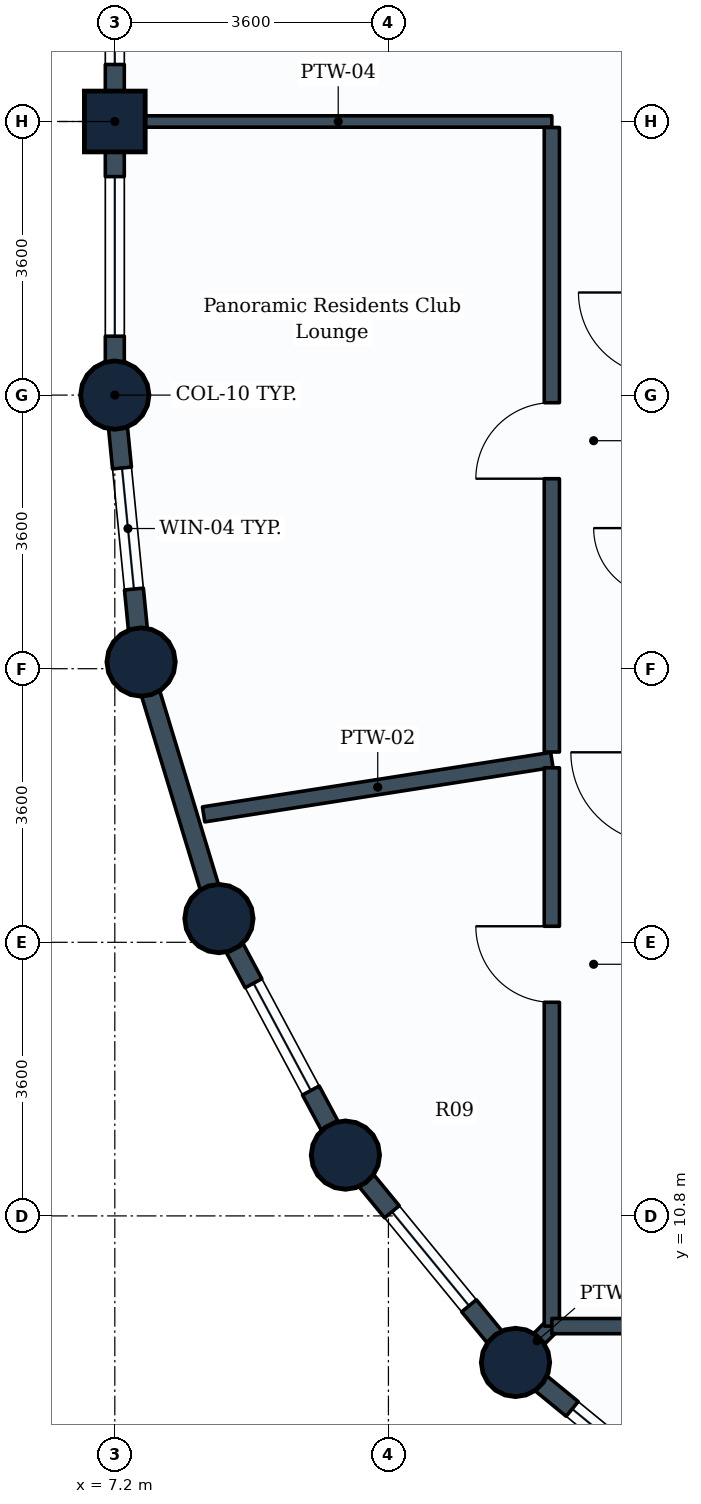
"""IFC4 building model, lengths in metres.
Left out: names, types, materials, properties, quantities, classifications, styles, units other than length and angle.
Written with IfcOpenShell. Run it as: python <this file> out.ifc"""

import sys

from ifc_helpers import new_model, si_unit, direction, frame, frame_2d, origin, origin_2d, place, context, subcontext, project, spatial, rectangle, circle, extrude, element, fill, save


model = new_model("IFC4")
c1 = context("Model", 3, precision=1e-05, world=origin(), true_north=direction((0.0, 1.0)))
c2 = subcontext(c1, "Body", "Model", "MODEL_VIEW")
j1 = project(units=[si_unit("LENGTHUNIT", "METRE"), si_unit("PLANEANGLEUNIT", "RADIAN")], contexts=[c1])
p1 = place(None, origin())
s1 = spatial("IfcSite", under=j1, at=p1, CompositionType="ELEMENT")
p2 = place(p1, origin())
s2 = spatial("IfcBuilding", under=s1, at=p2, CompositionType="ELEMENT")
p3 = place(p2, frame((0.0, 0.0, 231.8)))
s3 = spatial("IfcBuildingStorey", under=s2, at=p3, CompositionType="ELEMENT", Elevation=231.8)
p4 = place(p3, frame((7.2, 21.6, 0.0), z_axis=(0.0, 0.0, 1.0), x_axis=(1.0, 0.0, 0.0)))
e1 = element("IfcColumn", 1, at=p4, inside=s3, PredefinedType="COLUMN", context=c2, shape_type="SweptSolid", body=[
    extrude(circle(Radius=0.45, at=origin_2d()), origin(), (0.0, 0.0, 1.0), 3.6),
])
p5 = place(p3, frame((7.2, 25.2, 0.0), z_axis=(0.0, 0.0, 1.0), x_axis=(0.0, 1.0, 0.0)))
e2 = element("IfcColumn", 2, at=p5, inside=s3, PredefinedType="COLUMN", context=c2, shape_type="SweptSolid", body=[
    extrude(rectangle(XDim=0.8, YDim=0.8, at=origin_2d()), origin(), (0.0, 0.0, 1.0), 3.6),
])
for number, where, z_axis, x_axis in (
    (3, (7.546, 18.088, 0.0), (0.0, 0.0, 1.0), (1.0, 0.0, 0.0)),
    (4, (8.57, 14.712, 0.0), (0.0, 0.0, 1.0), (1.0, 0.0, 0.0)),
    (5, (10.234, 11.6, 0.0), (0.0, 0.0, 1.0), (1.0, 0.0, 0.0)),
    (6, (12.472, 8.872, 0.0), (0.0, 0.0, 1.0), (1.0, 0.0, 0.0)),
):
    element("IfcColumn", number, at=place(p3, frame(where, z_axis=z_axis, x_axis=x_axis)), inside=s3, PredefinedType="COLUMN", context=c2, shape_type="SweptSolid", body=[
        extrude(circle(Radius=0.45, at=origin_2d()), origin(), (0.0, 0.0, 1.0), 3.6),
    ])
p6 = place(p3, frame((7.2, 25.2, 0.0), z_axis=(0.0, 0.0, 1.0), x_axis=(0.0, 1.0, 0.0)))
e7 = element("IfcWall", 7, at=p6, inside=s3, PredefinedType="STANDARD", context=c2, shape_type="SweptSolid", body=[
    extrude(rectangle(XDim=3.6, YDim=0.25, at=frame_2d((1.8, 0.0))), origin(), (0.0, 0.0, 1.0), 2.83),
])
p7 = place(p6, frame((0.75, 0.0, 0.85)))
e8 = element("IfcOpeningElement", 8, at=p7, cuts=e7, PredefinedType="OPENING", context=c2, shape_type="SweptSolid", body=[
    extrude(rectangle(XDim=2.1, YDim=1.35, at=frame_2d((1.05, 0.675))), frame((0.0, 0.135, 0.0), z_axis=(0.0, -1.0, 0.0), x_axis=(1.0, 0.0, 0.0)), (0.0, 0.0, 1.0), 0.27),
])
p8 = place(p3, frame((7.2, 21.6, 0.0), z_axis=(0.0, 0.0, 1.0), x_axis=(0.0, 1.0, 0.0)))
e9 = element("IfcWall", 9, at=p8, inside=s3, PredefinedType="STANDARD", context=c2, shape_type="SweptSolid", body=[
    extrude(rectangle(XDim=3.6, YDim=0.25, at=frame_2d((1.8, 0.0))), origin(), (0.0, 0.0, 1.0), 2.83),
])
p9 = place(p8, frame((0.775, 0.0, 0.85)))
e10 = element("IfcOpeningElement", 10, at=p9, cuts=e9, PredefinedType="OPENING", context=c2, shape_type="SweptSolid", body=[
    extrude(rectangle(XDim=2.1, YDim=1.35, at=frame_2d((1.05, 0.675))), frame((0.0, 0.135, 0.0), z_axis=(0.0, -1.0, 0.0), x_axis=(1.0, 0.0, 0.0)), (0.0, 0.0, 1.0), 0.27),
])
p10 = place(p3, frame((7.546, 18.088, 0.0), z_axis=(0.0, 0.0, 1.0), x_axis=(-0.09802417461, 0.995184033831, 0.0)))
e11 = element("IfcWall", 11, at=p10, inside=s3, PredefinedType="STANDARD", context=c2, shape_type="SweptSolid", body=[
    extrude(rectangle(XDim=3.529, YDim=0.25, at=frame_2d((1.765, 0.0))), origin(), (0.0, 0.0, 1.0), 2.83),
])
p11 = place(p10, frame((0.965, 0.0, 0.85)))
e12 = element("IfcOpeningElement", 12, at=p11, cuts=e11, PredefinedType="OPENING", context=c2, shape_type="SweptSolid", body=[
    extrude(rectangle(XDim=1.6, YDim=1.35, at=frame_2d((0.8, 0.675))), frame((0.0, 0.135, 0.0), z_axis=(0.0, -1.0, 0.0), x_axis=(1.0, 0.0, 0.0)), (0.0, 0.0, 1.0), 0.27),
])
p12 = place(p3, frame((8.57, 14.712, 0.0), z_axis=(0.0, 0.0, 1.0), x_axis=(-0.290305086481, 0.956934144423, 0.0)))
e13 = element("IfcWall", 13, at=p12, inside=s3, PredefinedType="STANDARD", context=c2, shape_type="SweptSolid", body=[
    extrude(rectangle(XDim=3.528, YDim=0.25, at=frame_2d((1.764, 0.0))), origin(), (0.0, 0.0, 1.0), 2.83),
])
p13 = place(p3, frame((10.234, 11.6, 0.0), z_axis=(0.0, 0.0, 1.0), x_axis=(-0.47151087309, 0.881860247748, 0.0)))
e14 = element("IfcWall", 14, at=p13, inside=s3, PredefinedType="STANDARD", context=c2, shape_type="SweptSolid", body=[
    extrude(rectangle(XDim=3.529, YDim=0.25, at=frame_2d((1.764, 0.0))), origin(), (0.0, 0.0, 1.0), 2.83),
])
p14 = place(p13, frame((0.964, 0.0, 0.85)))
e15 = element("IfcOpeningElement", 15, at=p14, cuts=e14, PredefinedType="OPENING", context=c2, shape_type="SweptSolid", body=[
    extrude(rectangle(XDim=1.6, YDim=1.35, at=frame_2d((0.8, 0.675))), frame((0.0, 0.135, 0.0), z_axis=(0.0, -1.0, 0.0), x_axis=(1.0, 0.0, 0.0)), (0.0, 0.0, 1.0), 0.27),
])
p15 = place(p3, frame((12.472, 8.872, 0.0), z_axis=(0.0, 0.0, 1.0), x_axis=(-0.634258295121, 0.773121216285, 0.0)))
e16 = element("IfcWall", 16, at=p15, inside=s3, PredefinedType="STANDARD", context=c2, shape_type="SweptSolid", body=[
    extrude(rectangle(XDim=3.529, YDim=0.25, at=frame_2d((1.764, 0.0))), origin(), (0.0, 0.0, 1.0), 2.83),
])
p16 = place(p15, frame((0.964, 0.0, 0.85)))
e17 = element("IfcOpeningElement", 17, at=p16, cuts=e16, PredefinedType="OPENING", context=c2, shape_type="SweptSolid", body=[
    extrude(rectangle(XDim=1.6, YDim=1.35, at=frame_2d((0.8, 0.675))), frame((0.0, 0.135, 0.0), z_axis=(0.0, -1.0, 0.0), x_axis=(1.0, 0.0, 0.0)), (0.0, 0.0, 1.0), 0.27),
])
p17 = place(p3, frame((15.2, 6.634, 0.0), z_axis=(0.0, 0.0, 1.0), x_axis=(-0.773121216285, 0.634258295121, 0.0)))
e18 = element("IfcWall", 18, at=p17, inside=s3, PredefinedType="STANDARD", context=c2, shape_type="SweptSolid", body=[
    extrude(rectangle(XDim=3.529, YDim=0.25, at=frame_2d((1.764, 0.0))), origin(), (0.0, 0.0, 1.0), 2.83),
])
p18 = place(p17, frame((0.964, 0.0, 0.85)))
e19 = element("IfcOpeningElement", 19, at=p18, cuts=e18, PredefinedType="OPENING", context=c2, shape_type="SweptSolid", body=[
    extrude(rectangle(XDim=1.6, YDim=1.35, at=frame_2d((0.8, 0.675))), frame((0.0, 0.135, 0.0), z_axis=(0.0, -1.0, 0.0), x_axis=(1.0, 0.0, 0.0)), (0.0, 0.0, 1.0), 0.27),
])
p19 = place(p3, frame((7.329, 25.2, 0.0), z_axis=(0.0, 0.0, 1.0), x_axis=(1.0, 0.0, 0.0)))
e20 = element("IfcWall", 20, at=p19, inside=s3, PredefinedType="PARTITIONING", context=c2, shape_type="SweptSolid", body=[
    extrude(rectangle(XDim=5.621, YDim=0.15, at=frame_2d((2.811, 0.0))), origin(), (0.0, 0.0, 1.0), 3.335),
])
p20 = place(p3, frame((12.95, 16.8, 0.0), z_axis=(0.0, 0.0, 1.0), x_axis=(-0.9879733582, -0.154624200844, 0.0)))
e21 = element("IfcWall", 21, at=p20, inside=s3, PredefinedType="PARTITIONING", context=c2, shape_type="SweptSolid", body=[
    extrude(rectangle(XDim=4.637, YDim=0.2, at=frame_2d((2.319, 0.0))), origin(), (0.0, 0.0, 1.0), 2.83),
])
p21 = place(p3, frame((12.95, 9.35, 0.0), z_axis=(0.0, 0.0, 1.0), x_axis=(-0.706883613527, -0.707329878435, 0.0)))
e22 = element("IfcWall", 22, at=p21, inside=s3, PredefinedType="PARTITIONING", context=c2, shape_type="SweptSolid", body=[
    extrude(rectangle(XDim=0.547, YDim=0.2, at=frame_2d((0.273, 0.0))), origin(), (0.0, 0.0, 1.0), 3.02),
])
p22 = place(p3, frame((12.95, 16.904, 0.0), z_axis=(0.0, 0.0, 1.0), x_axis=(0.0, 1.0, 0.0)))
e23 = element("IfcWall", 23, at=p22, inside=s3, PredefinedType="PARTITIONING", context=c2, shape_type="SweptSolid", body=[
    extrude(rectangle(XDim=8.217, YDim=0.2, at=frame_2d((4.108, 0.0))), origin(), (0.0, 0.0, 1.0), 3.02),
])
p23 = place(p22, frame((3.596, 0.0, 0.0)))
e24 = element("IfcOpeningElement", 24, at=p23, cuts=e23, PredefinedType="OPENING", context=c2, shape_type="SweptSolid", body=[
    extrude(rectangle(XDim=1.0, YDim=2.1, at=frame_2d((0.5, 1.05))), frame((0.0, 0.11, 0.0), z_axis=(0.0, -1.0, 0.0), x_axis=(1.0, 0.0, 0.0)), (0.0, 0.0, 1.0), 0.22),
])
p24 = place(p3, frame((12.95, 9.35, 0.0), z_axis=(0.0, 0.0, 1.0), x_axis=(0.0, 1.0, 0.0)))
e25 = element("IfcWall", 25, at=p24, inside=s3, PredefinedType="PARTITIONING", context=c2, shape_type="SweptSolid", body=[
    extrude(rectangle(XDim=7.346, YDim=0.2, at=frame_2d((3.673, 0.0))), origin(), (0.0, 0.0, 1.0), 3.02),
])
p25 = place(p24, frame((4.261, 0.0, 0.0)))
e26 = element("IfcOpeningElement", 26, at=p25, cuts=e25, PredefinedType="OPENING", context=c2, shape_type="SweptSolid", body=[
    extrude(rectangle(XDim=1.0, YDim=2.1, at=frame_2d((0.5, 1.05))), frame((0.0, 0.11, 0.0), z_axis=(0.0, -1.0, 0.0), x_axis=(1.0, 0.0, 0.0)), (0.0, 0.0, 1.0), 0.22),
])
p26 = place(p3, frame((12.95, 9.35, 0.0), z_axis=(0.0, 0.0, 1.0), x_axis=(1.0, 0.0, 0.0)))
e27 = element("IfcWall", 27, at=p26, inside=s3, PredefinedType="PARTITIONING", context=c2, shape_type="SweptSolid", body=[
    extrude(rectangle(XDim=7.346, YDim=0.2, at=frame_2d((3.673, 0.0))), origin(), (0.0, 0.0, 1.0), 3.02),
])
p27 = place(p26, frame((4.261, 0.0, 0.0)))
e28 = element("IfcOpeningElement", 28, at=p27, cuts=e27, PredefinedType="OPENING", context=c2, shape_type="SweptSolid", body=[
    extrude(rectangle(XDim=1.0, YDim=2.1, at=frame_2d((0.5, 1.05))), frame((0.0, 0.11, 0.0), z_axis=(0.0, -1.0, 0.0), x_axis=(1.0, 0.0, 0.0)), (0.0, 0.0, 1.0), 0.22),
])
p28 = place(p7, origin())
e29 = element("IfcWindow", 29, at=p28, inside=s3, PartitioningType="SINGLE_PANEL", PredefinedType="WINDOW", context=c2, shape_type="SweptSolid", body=[
    extrude(rectangle(XDim=2.1, YDim=1.35, at=frame_2d((1.05, 0.675))), frame((0.0, 0.03, 0.0), z_axis=(0.0, -1.0, 0.0), x_axis=(1.0, 0.0, 0.0)), (0.0, 0.0, 1.0), 0.06),
])
fill(e8, e29)
p29 = place(p9, origin())
e30 = element("IfcWindow", 30, at=p29, inside=s3, PartitioningType="SINGLE_PANEL", PredefinedType="WINDOW", context=c2, shape_type="SweptSolid", body=[
    extrude(rectangle(XDim=2.1, YDim=1.35, at=frame_2d((1.05, 0.675))), frame((0.0, 0.03, 0.0), z_axis=(0.0, -1.0, 0.0), x_axis=(1.0, 0.0, 0.0)), (0.0, 0.0, 1.0), 0.06),
])
fill(e10, e30)
p30 = place(p11, origin())
e31 = element("IfcWindow", 31, at=p30, inside=s3, PartitioningType="SINGLE_PANEL", PredefinedType="WINDOW", context=c2, shape_type="SweptSolid", body=[
    extrude(rectangle(XDim=1.6, YDim=1.35, at=frame_2d((0.8, 0.675))), frame((0.0, 0.03, 0.0), z_axis=(0.0, -1.0, 0.0), x_axis=(1.0, 0.0, 0.0)), (0.0, 0.0, 1.0), 0.06),
])
fill(e12, e31)
p31 = place(p14, origin())
e32 = element("IfcWindow", 32, at=p31, inside=s3, PartitioningType="SINGLE_PANEL", PredefinedType="WINDOW", context=c2, shape_type="SweptSolid", body=[
    extrude(rectangle(XDim=1.6, YDim=1.35, at=frame_2d((0.8, 0.675))), frame((0.0, 0.03, 0.0), z_axis=(0.0, -1.0, 0.0), x_axis=(1.0, 0.0, 0.0)), (0.0, 0.0, 1.0), 0.06),
])
fill(e15, e32)
p32 = place(p16, origin())
e33 = element("IfcWindow", 33, at=p32, inside=s3, PartitioningType="SINGLE_PANEL", PredefinedType="WINDOW", context=c2, shape_type="SweptSolid", body=[
    extrude(rectangle(XDim=1.6, YDim=1.35, at=frame_2d((0.8, 0.675))), frame((0.0, 0.03, 0.0), z_axis=(0.0, -1.0, 0.0), x_axis=(1.0, 0.0, 0.0)), (0.0, 0.0, 1.0), 0.06),
])
fill(e17, e33)
p33 = place(p18, origin())
e34 = element("IfcWindow", 34, at=p33, inside=s3, PartitioningType="SINGLE_PANEL", PredefinedType="WINDOW", context=c2, shape_type="SweptSolid", body=[
    extrude(rectangle(XDim=1.6, YDim=1.35, at=frame_2d((0.8, 0.675))), frame((0.0, 0.03, 0.0), z_axis=(0.0, -1.0, 0.0), x_axis=(1.0, 0.0, 0.0)), (0.0, 0.0, 1.0), 0.06),
])
fill(e19, e34)
p34 = place(p23, origin())
e35 = element("IfcDoor", 35, at=p34, inside=s3, OperationType="SINGLE_SWING_LEFT", PredefinedType="DOOR", context=c2, shape_type="SweptSolid", body=[
    extrude(rectangle(XDim=1.0, YDim=2.1, at=frame_2d((0.5, 1.05))), frame((0.0, 0.025, 0.0), z_axis=(0.0, -1.0, 0.0), x_axis=(1.0, 0.0, 0.0)), (0.0, 0.0, 1.0), 0.05),
])
fill(e24, e35)
p35 = place(p25, origin())
e36 = element("IfcDoor", 36, at=p35, inside=s3, OperationType="SINGLE_SWING_RIGHT", PredefinedType="DOOR", context=c2, shape_type="SweptSolid", body=[
    extrude(rectangle(XDim=1.0, YDim=2.1, at=frame_2d((0.5, 1.05))), frame((0.0, 0.025, 0.0), z_axis=(0.0, -1.0, 0.0), x_axis=(1.0, 0.0, 0.0)), (0.0, 0.0, 1.0), 0.05),
])
fill(e26, e36)
save(model, sys.argv[1])
